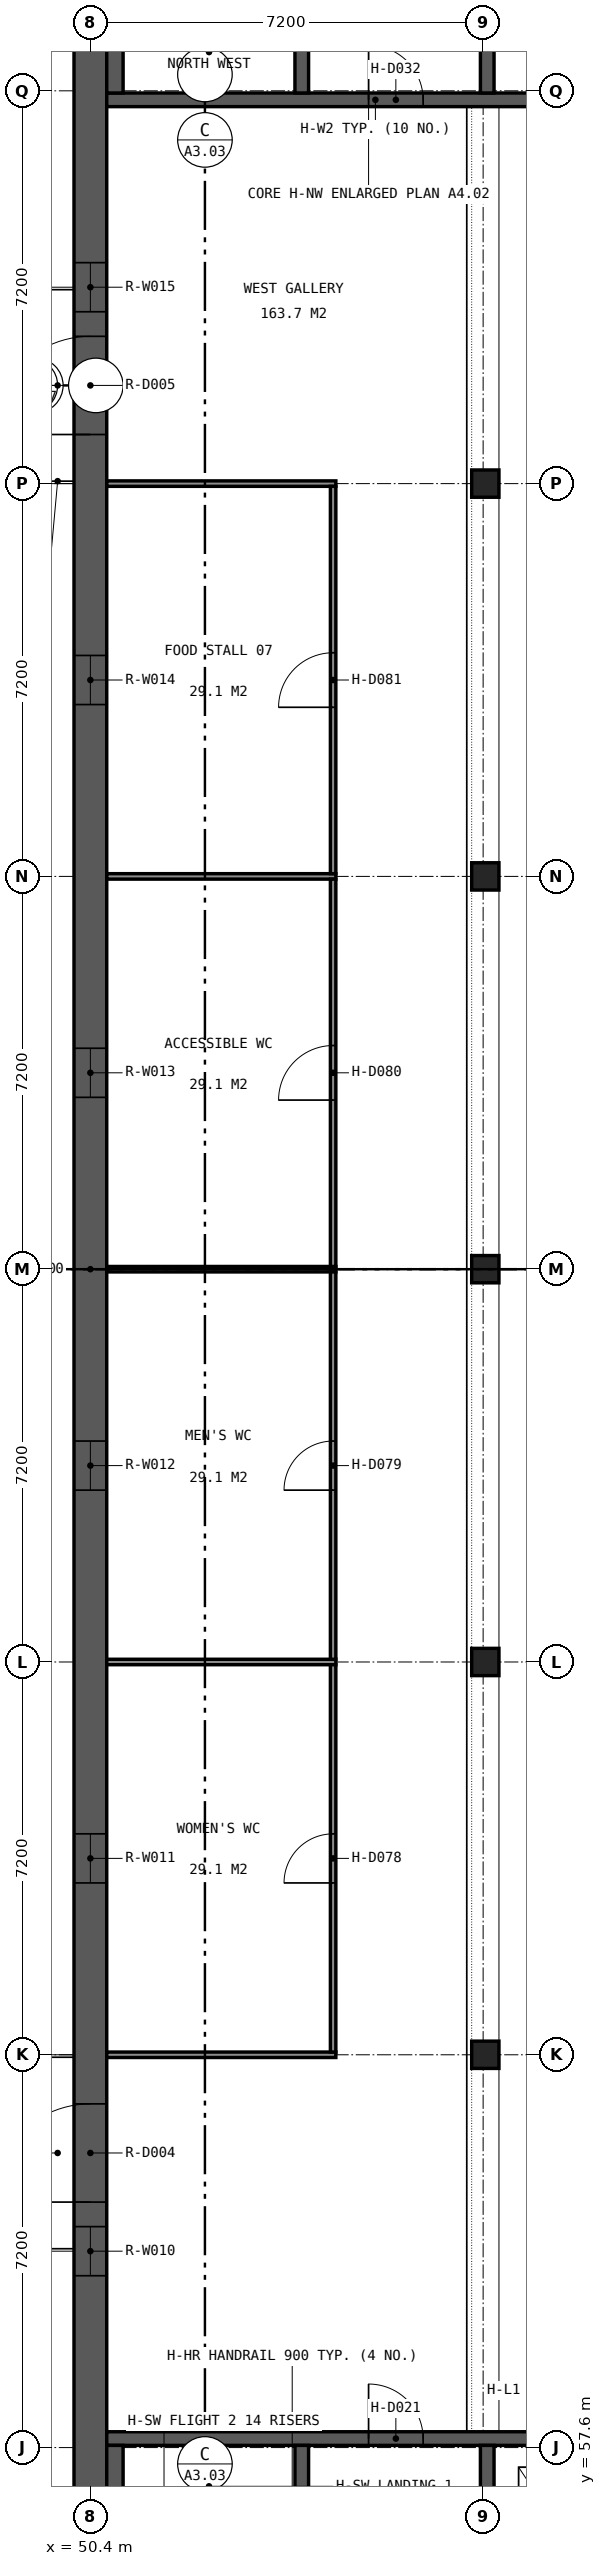
"""IFC4 building model, lengths in metres.
Left out: names, types, materials, properties, quantities, classifications, styles, units other than length and angle.
Written with IfcOpenShell. Run it as: python <this file> out.ifc"""

import sys

from ifc_helpers import new_model, si_unit, direction, frame, frame_2d, origin, origin_2d, place, context, subcontext, project, spatial, rectangle, extrude, element, fill, save


model = new_model("IFC4")
c1 = context("Model", 3, precision=1e-05, world=origin(), true_north=direction((0.0, 1.0)))
c2 = subcontext(c1, "Body", "Model", "MODEL_VIEW")
j1 = project(units=[si_unit("LENGTHUNIT", "METRE"), si_unit("PLANEANGLEUNIT", "RADIAN")], contexts=[c1])
p1 = place(None, origin())
s1 = spatial("IfcSite", under=j1, at=p1, CompositionType="ELEMENT")
p2 = place(p1, origin())
s2 = spatial("IfcBuilding", under=s1, at=p2, CompositionType="ELEMENT")
p3 = place(p2, frame((0.0, 0.0, 4.8)))
s3 = spatial("IfcBuildingStorey", under=s2, at=p3, CompositionType="ELEMENT", Elevation=4.8)
p4 = place(p3, frame((50.4, 52.2, 0.0), z_axis=(0.0, 0.0, 1.0), x_axis=(0.0, 1.0, 0.0)))
e1 = element("IfcWall", 1, at=p4, inside=s3, PredefinedType="SOLIDWALL", context=c2, shape_type="SweptSolid", body=[
    extrude(rectangle(XDim=54.0, YDim=0.6, at=frame_2d((27.0, 0.0))), origin(), (0.0, 0.0, 1.0), 4.8),
])
p5 = place(p4, frame((1.35, 0.0, 0.9)))
e2 = element("IfcOpeningElement", 2, at=p5, cuts=e1, PredefinedType="OPENING", context=c2, shape_type="SweptSolid", body=[
    extrude(rectangle(XDim=0.9, YDim=3.3, at=frame_2d((0.45, 1.65))), frame((0.0, 0.31, 0.0), z_axis=(0.0, -1.0, 0.0), x_axis=(1.0, 0.0, 0.0)), (0.0, 0.0, 1.0), 0.62),
])
p6 = place(p4, frame((8.55, 0.0, 0.9)))
e3 = element("IfcOpeningElement", 3, at=p6, cuts=e1, PredefinedType="OPENING", context=c2, shape_type="SweptSolid", body=[
    extrude(rectangle(XDim=0.9, YDim=3.3, at=frame_2d((0.45, 1.65))), frame((0.0, 0.31, 0.0), z_axis=(0.0, -1.0, 0.0), x_axis=(1.0, 0.0, 0.0)), (0.0, 0.0, 1.0), 0.62),
])
p7 = place(p4, frame((15.75, 0.0, 0.9)))
e4 = element("IfcOpeningElement", 4, at=p7, cuts=e1, PredefinedType="OPENING", context=c2, shape_type="SweptSolid", body=[
    extrude(rectangle(XDim=0.9, YDim=3.3, at=frame_2d((0.45, 1.65))), frame((0.0, 0.31, 0.0), z_axis=(0.0, -1.0, 0.0), x_axis=(1.0, 0.0, 0.0)), (0.0, 0.0, 1.0), 0.62),
])
p8 = place(p4, frame((22.95, 0.0, 0.9)))
e5 = element("IfcOpeningElement", 5, at=p8, cuts=e1, PredefinedType="OPENING", context=c2, shape_type="SweptSolid", body=[
    extrude(rectangle(XDim=0.9, YDim=3.3, at=frame_2d((0.45, 1.65))), frame((0.0, 0.31, 0.0), z_axis=(0.0, -1.0, 0.0), x_axis=(1.0, 0.0, 0.0)), (0.0, 0.0, 1.0), 0.62),
])
p9 = place(p4, frame((30.15, 0.0, 0.9)))
e6 = element("IfcOpeningElement", 6, at=p9, cuts=e1, PredefinedType="OPENING", context=c2, shape_type="SweptSolid", body=[
    extrude(rectangle(XDim=0.9, YDim=3.3, at=frame_2d((0.45, 1.65))), frame((0.0, 0.31, 0.0), z_axis=(0.0, -1.0, 0.0), x_axis=(1.0, 0.0, 0.0)), (0.0, 0.0, 1.0), 0.62),
])
p10 = place(p4, frame((37.35, 0.0, 0.9)))
e7 = element("IfcOpeningElement", 7, at=p10, cuts=e1, PredefinedType="OPENING", context=c2, shape_type="SweptSolid", body=[
    extrude(rectangle(XDim=0.9, YDim=3.3, at=frame_2d((0.45, 1.65))), frame((0.0, 0.31, 0.0), z_axis=(0.0, -1.0, 0.0), x_axis=(1.0, 0.0, 0.0)), (0.0, 0.0, 1.0), 0.62),
])
p11 = place(p4, frame((44.55, 0.0, 0.9)))
e8 = element("IfcOpeningElement", 8, at=p11, cuts=e1, PredefinedType="OPENING", context=c2, shape_type="SweptSolid", body=[
    extrude(rectangle(XDim=0.9, YDim=3.3, at=frame_2d((0.45, 1.65))), frame((0.0, 0.31, 0.0), z_axis=(0.0, -1.0, 0.0), x_axis=(1.0, 0.0, 0.0)), (0.0, 0.0, 1.0), 0.62),
])
p12 = place(p4, frame((51.75, 0.0, 0.9)))
e9 = element("IfcOpeningElement", 9, at=p12, cuts=e1, PredefinedType="OPENING", context=c2, shape_type="SweptSolid", body=[
    extrude(rectangle(XDim=0.9, YDim=3.3, at=frame_2d((0.45, 1.65))), frame((0.0, 0.31, 0.0), z_axis=(0.0, -1.0, 0.0), x_axis=(1.0, 0.0, 0.0)), (0.0, 0.0, 1.0), 0.62),
])
p13 = place(p4, frame((9.9, 0.0, 0.0)))
e10 = element("IfcOpeningElement", 10, at=p13, cuts=e1, PredefinedType="OPENING", context=c2, shape_type="SweptSolid", body=[
    extrude(rectangle(XDim=1.8, YDim=2.4, at=frame_2d((0.9, 1.2))), frame((0.0, 0.31, 0.0), z_axis=(0.0, -1.0, 0.0), x_axis=(1.0, 0.0, 0.0)), (0.0, 0.0, 1.0), 0.62),
])
p14 = place(p4, frame((42.3, 0.0, 0.0)))
e11 = element("IfcOpeningElement", 11, at=p14, cuts=e1, PredefinedType="OPENING", context=c2, shape_type="SweptSolid", body=[
    extrude(rectangle(XDim=1.8, YDim=2.4, at=frame_2d((0.9, 1.2))), frame((0.0, 0.31, 0.0), z_axis=(0.0, -1.0, 0.0), x_axis=(1.0, 0.0, 0.0)), (0.0, 0.0, 1.0), 0.62),
])
for number, where, z_axis, x_axis in (
    (12, (57.64, 64.8, 0.0), (0.0, 0.0, 1.0), (1.0, 0.0, 0.0)),
    (13, (57.64, 72.0, 0.0), (0.0, 0.0, 1.0), (1.0, 0.0, 0.0)),
    (14, (57.64, 79.2, 0.0), (0.0, 0.0, 1.0), (1.0, 0.0, 0.0)),
    (15, (57.64, 86.4, 0.0), (0.0, 0.0, 1.0), (1.0, 0.0, 0.0)),
    (16, (57.64, 93.6, 0.0), (0.0, 0.0, 1.0), (1.0, 0.0, 0.0)),
):
    element("IfcColumn", number, at=place(p3, frame(where, z_axis=z_axis, x_axis=x_axis)), inside=s3, PredefinedType="COLUMN", context=c2, shape_type="SweptSolid", body=[
        extrude(rectangle(XDim=0.5, YDim=0.5, at=origin_2d()), origin(), (0.0, 0.0, 1.0), 4.8),
    ])
p15 = place(p3, frame((50.7, 57.765, 0.0), z_axis=(0.0, 0.0, 1.0), x_axis=(1.0, 0.0, 0.0)))
e17 = element("IfcWall", 17, at=p15, inside=s3, PredefinedType="SOLIDWALL", context=c2, shape_type="SweptSolid", body=[
    extrude(rectangle(XDim=9.85, YDim=0.25, at=frame_2d((4.925, 0.0))), origin(), (0.0, 0.0, 1.0), 4.8),
])
p16 = place(p15, frame((4.8, 0.0, 0.0)))
e18 = element("IfcOpeningElement", 18, at=p16, cuts=e17, PredefinedType="OPENING", context=c2, shape_type="SweptSolid", body=[
    extrude(rectangle(XDim=1.0, YDim=2.1, at=frame_2d((0.5, 1.05))), frame((0.0, 0.135, 0.0), z_axis=(0.0, -1.0, 0.0), x_axis=(1.0, 0.0, 0.0)), (0.0, 0.0, 1.0), 0.27),
])
p17 = place(p3, frame((54.275, 51.0, 0.0), z_axis=(0.0, 0.0, 1.0), x_axis=(0.0, 1.0, 0.0)))
e19 = element("IfcWall", 19, at=p17, inside=s3, PredefinedType="SOLIDWALL", context=c2, shape_type="SweptSolid", body=[
    extrude(rectangle(XDim=6.64, YDim=0.25, at=frame_2d((3.32, 0.0))), origin(), (0.0, 0.0, 1.0), 4.8),
])
p18 = place(p17, frame((0.35, 0.0, 0.0)))
e20 = element("IfcOpeningElement", 20, at=p18, cuts=e19, PredefinedType="OPENING", context=c2, shape_type="SweptSolid", body=[
    extrude(rectangle(XDim=1.0, YDim=2.1, at=frame_2d((0.5, 1.05))), frame((0.0, 0.135, 0.0), z_axis=(0.0, -1.0, 0.0), x_axis=(1.0, 0.0, 0.0)), (0.0, 0.0, 1.0), 0.27),
])
p19 = place(p3, frame((57.675, 54.39, 0.0), z_axis=(0.0, 0.0, 1.0), x_axis=(0.0, 1.0, 0.0)))
e21 = element("IfcWall", 21, at=p19, inside=s3, PredefinedType="SOLIDWALL", context=c2, shape_type="SweptSolid", body=[
    extrude(rectangle(XDim=3.25, YDim=0.25, at=frame_2d((1.625, 0.0))), origin(), (0.0, 0.0, 1.0), 4.8),
])
p20 = place(p3, frame((50.85, 52.2, 0.0), z_axis=(0.0, 0.0, 1.0), x_axis=(0.0, 1.0, 0.0)))
e22 = element("IfcWall", 22, at=p20, inside=s3, PredefinedType="SOLIDWALL", context=c2, shape_type="SweptSolid", body=[
    extrude(rectangle(XDim=5.44, YDim=0.3, at=frame_2d((2.72, 0.0))), origin(), (0.0, 0.0, 1.0), 4.8),
])
p21 = place(p3, frame((50.7, 100.635, 0.0), z_axis=(0.0, 0.0, 1.0), x_axis=(1.0, 0.0, 0.0)))
e23 = element("IfcWall", 23, at=p21, inside=s3, PredefinedType="SOLIDWALL", context=c2, shape_type="SweptSolid", body=[
    extrude(rectangle(XDim=9.85, YDim=0.25, at=frame_2d((4.925, 0.0))), origin(), (0.0, 0.0, 1.0), 4.8),
])
p22 = place(p21, frame((4.8, 0.0, 0.0)))
e24 = element("IfcOpeningElement", 24, at=p22, cuts=e23, PredefinedType="OPENING", context=c2, shape_type="SweptSolid", body=[
    extrude(rectangle(XDim=1.0, YDim=2.1, at=frame_2d((0.5, 1.05))), frame((0.0, 0.135, 0.0), z_axis=(0.0, -1.0, 0.0), x_axis=(1.0, 0.0, 0.0)), (0.0, 0.0, 1.0), 0.27),
])
p23 = place(p3, frame((54.275, 100.76, 0.0), z_axis=(0.0, 0.0, 1.0), x_axis=(0.0, 1.0, 0.0)))
e25 = element("IfcWall", 25, at=p23, inside=s3, PredefinedType="SOLIDWALL", context=c2, shape_type="SweptSolid", body=[
    extrude(rectangle(XDim=6.64, YDim=0.25, at=frame_2d((3.32, 0.0))), origin(), (0.0, 0.0, 1.0), 4.8),
])
p24 = place(p23, frame((5.29, 0.0, 0.0)))
e26 = element("IfcOpeningElement", 26, at=p24, cuts=e25, PredefinedType="OPENING", context=c2, shape_type="SweptSolid", body=[
    extrude(rectangle(XDim=1.0, YDim=2.1, at=frame_2d((0.5, 1.05))), frame((0.0, 0.135, 0.0), z_axis=(0.0, -1.0, 0.0), x_axis=(1.0, 0.0, 0.0)), (0.0, 0.0, 1.0), 0.27),
])
p25 = place(p3, frame((57.675, 100.76, 0.0), z_axis=(0.0, 0.0, 1.0), x_axis=(0.0, 1.0, 0.0)))
e27 = element("IfcWall", 27, at=p25, inside=s3, PredefinedType="SOLIDWALL", context=c2, shape_type="SweptSolid", body=[
    extrude(rectangle(XDim=3.25, YDim=0.25, at=frame_2d((1.625, 0.0))), origin(), (0.0, 0.0, 1.0), 4.8),
])
p26 = place(p3, frame((50.85, 100.76, 0.0), z_axis=(0.0, 0.0, 1.0), x_axis=(0.0, 1.0, 0.0)))
e28 = element("IfcWall", 28, at=p26, inside=s3, PredefinedType="SOLIDWALL", context=c2, shape_type="SweptSolid", body=[
    extrude(rectangle(XDim=5.44, YDim=0.3, at=frame_2d((2.72, 0.0))), origin(), (0.0, 0.0, 1.0), 4.8),
])
for number, where, z_axis, x_axis in (
    (29, (50.7, 64.8, 0.0), (0.0, 0.0, 1.0), (1.0, 0.0, 0.0)),
    (30, (50.7, 72.0, 0.0), (0.0, 0.0, 1.0), (1.0, 0.0, 0.0)),
    (31, (50.7, 79.2, 0.0), (0.0, 0.0, 1.0), (1.0, 0.0, 0.0)),
    (32, (50.7, 86.4, 0.0), (0.0, 0.0, 1.0), (1.0, 0.0, 0.0)),
    (33, (50.7, 93.6, 0.0), (0.0, 0.0, 1.0), (1.0, 0.0, 0.0)),
):
    element("IfcWall", number, at=place(p3, frame(where, z_axis=z_axis, x_axis=x_axis)), inside=s3, PredefinedType="PARTITIONING", context=c2, shape_type="SweptSolid", body=[
        extrude(rectangle(XDim=4.2, YDim=0.1, at=frame_2d((2.1, 0.0))), origin(), (0.0, 0.0, 1.0), 3.95),
    ])
p27 = place(p3, frame((54.85, 64.85, 0.0), z_axis=(0.0, 0.0, 1.0), x_axis=(0.0, 1.0, 0.0)))
e34 = element("IfcWall", 34, at=p27, inside=s3, PredefinedType="PARTITIONING", context=c2, shape_type="SweptSolid", body=[
    extrude(rectangle(XDim=7.1, YDim=0.1, at=frame_2d((3.55, 0.0))), origin(), (0.0, 0.0, 1.0), 3.95),
])
p28 = place(p27, frame((3.1, 0.0, 0.0)))
e35 = element("IfcOpeningElement", 35, at=p28, cuts=e34, PredefinedType="OPENING", context=c2, shape_type="SweptSolid", body=[
    extrude(rectangle(XDim=0.9, YDim=2.1, at=frame_2d((0.45, 1.05))), frame((0.0, 0.06, 0.0), z_axis=(0.0, -1.0, 0.0), x_axis=(1.0, 0.0, 0.0)), (0.0, 0.0, 1.0), 0.12),
])
p29 = place(p3, frame((54.85, 72.05, 0.0), z_axis=(0.0, 0.0, 1.0), x_axis=(0.0, 1.0, 0.0)))
e36 = element("IfcWall", 36, at=p29, inside=s3, PredefinedType="PARTITIONING", context=c2, shape_type="SweptSolid", body=[
    extrude(rectangle(XDim=7.1, YDim=0.1, at=frame_2d((3.55, 0.0))), origin(), (0.0, 0.0, 1.0), 3.95),
])
p30 = place(p29, frame((3.1, 0.0, 0.0)))
e37 = element("IfcOpeningElement", 37, at=p30, cuts=e36, PredefinedType="OPENING", context=c2, shape_type="SweptSolid", body=[
    extrude(rectangle(XDim=0.9, YDim=2.1, at=frame_2d((0.45, 1.05))), frame((0.0, 0.06, 0.0), z_axis=(0.0, -1.0, 0.0), x_axis=(1.0, 0.0, 0.0)), (0.0, 0.0, 1.0), 0.12),
])
p31 = place(p3, frame((54.85, 79.25, 0.0), z_axis=(0.0, 0.0, 1.0), x_axis=(0.0, 1.0, 0.0)))
e38 = element("IfcWall", 38, at=p31, inside=s3, PredefinedType="PARTITIONING", context=c2, shape_type="SweptSolid", body=[
    extrude(rectangle(XDim=7.1, YDim=0.1, at=frame_2d((3.55, 0.0))), origin(), (0.0, 0.0, 1.0), 3.95),
])
p32 = place(p31, frame((3.05, 0.0, 0.0)))
e39 = element("IfcOpeningElement", 39, at=p32, cuts=e38, PredefinedType="OPENING", context=c2, shape_type="SweptSolid", body=[
    extrude(rectangle(XDim=1.0, YDim=2.1, at=frame_2d((0.5, 1.05))), frame((0.0, 0.06, 0.0), z_axis=(0.0, -1.0, 0.0), x_axis=(1.0, 0.0, 0.0)), (0.0, 0.0, 1.0), 0.12),
])
p33 = place(p3, frame((54.85, 86.45, 0.0), z_axis=(0.0, 0.0, 1.0), x_axis=(0.0, 1.0, 0.0)))
e40 = element("IfcWall", 40, at=p33, inside=s3, PredefinedType="PARTITIONING", context=c2, shape_type="SweptSolid", body=[
    extrude(rectangle(XDim=7.1, YDim=0.1, at=frame_2d((3.55, 0.0))), origin(), (0.0, 0.0, 1.0), 3.95),
])
p34 = place(p33, frame((3.05, 0.0, 0.0)))
e41 = element("IfcOpeningElement", 41, at=p34, cuts=e40, PredefinedType="OPENING", context=c2, shape_type="SweptSolid", body=[
    extrude(rectangle(XDim=1.0, YDim=2.1, at=frame_2d((0.5, 1.05))), frame((0.0, 0.06, 0.0), z_axis=(0.0, -1.0, 0.0), x_axis=(1.0, 0.0, 0.0)), (0.0, 0.0, 1.0), 0.12),
])
p35 = place(p6, origin())
e42 = element("IfcWindow", 42, at=p35, inside=s3, PartitioningType="SINGLE_PANEL", PredefinedType="WINDOW", context=c2, shape_type="SweptSolid", body=[
    extrude(rectangle(XDim=0.9, YDim=3.3, at=frame_2d((0.45, 1.65))), frame((0.0, 0.03, 0.0), z_axis=(0.0, -1.0, 0.0), x_axis=(1.0, 0.0, 0.0)), (0.0, 0.0, 1.0), 0.06),
])
fill(e3, e42)
p36 = place(p7, origin())
e43 = element("IfcWindow", 43, at=p36, inside=s3, PartitioningType="SINGLE_PANEL", PredefinedType="WINDOW", context=c2, shape_type="SweptSolid", body=[
    extrude(rectangle(XDim=0.9, YDim=3.3, at=frame_2d((0.45, 1.65))), frame((0.0, 0.03, 0.0), z_axis=(0.0, -1.0, 0.0), x_axis=(1.0, 0.0, 0.0)), (0.0, 0.0, 1.0), 0.06),
])
fill(e4, e43)
p37 = place(p8, origin())
e44 = element("IfcWindow", 44, at=p37, inside=s3, PartitioningType="SINGLE_PANEL", PredefinedType="WINDOW", context=c2, shape_type="SweptSolid", body=[
    extrude(rectangle(XDim=0.9, YDim=3.3, at=frame_2d((0.45, 1.65))), frame((0.0, 0.03, 0.0), z_axis=(0.0, -1.0, 0.0), x_axis=(1.0, 0.0, 0.0)), (0.0, 0.0, 1.0), 0.06),
])
fill(e5, e44)
p38 = place(p9, origin())
e45 = element("IfcWindow", 45, at=p38, inside=s3, PartitioningType="SINGLE_PANEL", PredefinedType="WINDOW", context=c2, shape_type="SweptSolid", body=[
    extrude(rectangle(XDim=0.9, YDim=3.3, at=frame_2d((0.45, 1.65))), frame((0.0, 0.03, 0.0), z_axis=(0.0, -1.0, 0.0), x_axis=(1.0, 0.0, 0.0)), (0.0, 0.0, 1.0), 0.06),
])
fill(e6, e45)
p39 = place(p10, origin())
e46 = element("IfcWindow", 46, at=p39, inside=s3, PartitioningType="SINGLE_PANEL", PredefinedType="WINDOW", context=c2, shape_type="SweptSolid", body=[
    extrude(rectangle(XDim=0.9, YDim=3.3, at=frame_2d((0.45, 1.65))), frame((0.0, 0.03, 0.0), z_axis=(0.0, -1.0, 0.0), x_axis=(1.0, 0.0, 0.0)), (0.0, 0.0, 1.0), 0.06),
])
fill(e7, e46)
p40 = place(p11, origin())
e47 = element("IfcWindow", 47, at=p40, inside=s3, PartitioningType="SINGLE_PANEL", PredefinedType="WINDOW", context=c2, shape_type="SweptSolid", body=[
    extrude(rectangle(XDim=0.9, YDim=3.3, at=frame_2d((0.45, 1.65))), frame((0.0, 0.03, 0.0), z_axis=(0.0, -1.0, 0.0), x_axis=(1.0, 0.0, 0.0)), (0.0, 0.0, 1.0), 0.06),
])
fill(e8, e47)
p41 = place(p13, origin())
e48 = element("IfcDoor", 48, at=p41, inside=s3, OperationType="DOUBLE_DOOR_SINGLE_SWING", PredefinedType="DOOR", context=c2, shape_type="SweptSolid", body=[
    extrude(rectangle(XDim=1.8, YDim=2.4, at=frame_2d((0.9, 1.2))), frame((0.0, 0.025, 0.0), z_axis=(0.0, -1.0, 0.0), x_axis=(1.0, 0.0, 0.0)), (0.0, 0.0, 1.0), 0.05),
])
fill(e10, e48)
p42 = place(p14, origin())
e49 = element("IfcDoor", 49, at=p42, inside=s3, OperationType="DOUBLE_DOOR_SINGLE_SWING", PredefinedType="DOOR", context=c2, shape_type="SweptSolid", body=[
    extrude(rectangle(XDim=1.8, YDim=2.4, at=frame_2d((0.9, 1.2))), frame((0.0, 0.025, 0.0), z_axis=(0.0, -1.0, 0.0), x_axis=(1.0, 0.0, 0.0)), (0.0, 0.0, 1.0), 0.05),
])
fill(e11, e49)
p43 = place(p16, origin())
e50 = element("IfcDoor", 50, at=p43, inside=s3, OperationType="SINGLE_SWING_LEFT", PredefinedType="DOOR", context=c2, shape_type="SweptSolid", body=[
    extrude(rectangle(XDim=1.0, YDim=2.1, at=frame_2d((0.5, 1.05))), frame((0.0, 0.025, 0.0), z_axis=(0.0, -1.0, 0.0), x_axis=(1.0, 0.0, 0.0)), (0.0, 0.0, 1.0), 0.05),
])
fill(e18, e50)
p44 = place(p22, origin())
e51 = element("IfcDoor", 51, at=p44, inside=s3, OperationType="SINGLE_SWING_LEFT", PredefinedType="DOOR", context=c2, shape_type="SweptSolid", body=[
    extrude(rectangle(XDim=1.0, YDim=2.1, at=frame_2d((0.5, 1.05))), frame((0.0, 0.025, 0.0), z_axis=(0.0, -1.0, 0.0), x_axis=(1.0, 0.0, 0.0)), (0.0, 0.0, 1.0), 0.05),
])
fill(e24, e51)
p45 = place(p28, origin())
e52 = element("IfcDoor", 52, at=p45, inside=s3, OperationType="SINGLE_SWING_LEFT", PredefinedType="DOOR", context=c2, shape_type="SweptSolid", body=[
    extrude(rectangle(XDim=0.9, YDim=2.1, at=frame_2d((0.45, 1.05))), frame((0.0, 0.025, 0.0), z_axis=(0.0, -1.0, 0.0), x_axis=(1.0, 0.0, 0.0)), (0.0, 0.0, 1.0), 0.05),
])
fill(e35, e52)
p46 = place(p30, origin())
e53 = element("IfcDoor", 53, at=p46, inside=s3, OperationType="SINGLE_SWING_LEFT", PredefinedType="DOOR", context=c2, shape_type="SweptSolid", body=[
    extrude(rectangle(XDim=0.9, YDim=2.1, at=frame_2d((0.45, 1.05))), frame((0.0, 0.025, 0.0), z_axis=(0.0, -1.0, 0.0), x_axis=(1.0, 0.0, 0.0)), (0.0, 0.0, 1.0), 0.05),
])
fill(e37, e53)
p47 = place(p32, origin())
e54 = element("IfcDoor", 54, at=p47, inside=s3, OperationType="SINGLE_SWING_LEFT", PredefinedType="DOOR", context=c2, shape_type="SweptSolid", body=[
    extrude(rectangle(XDim=1.0, YDim=2.1, at=frame_2d((0.5, 1.05))), frame((0.0, 0.025, 0.0), z_axis=(0.0, -1.0, 0.0), x_axis=(1.0, 0.0, 0.0)), (0.0, 0.0, 1.0), 0.05),
])
fill(e39, e54)
p48 = place(p34, origin())
e55 = element("IfcDoor", 55, at=p48, inside=s3, OperationType="SINGLE_SWING_LEFT", PredefinedType="DOOR", context=c2, shape_type="SweptSolid", body=[
    extrude(rectangle(XDim=1.0, YDim=2.1, at=frame_2d((0.5, 1.05))), frame((0.0, 0.025, 0.0), z_axis=(0.0, -1.0, 0.0), x_axis=(1.0, 0.0, 0.0)), (0.0, 0.0, 1.0), 0.05),
])
fill(e41, e55)
save(model, sys.argv[1])
